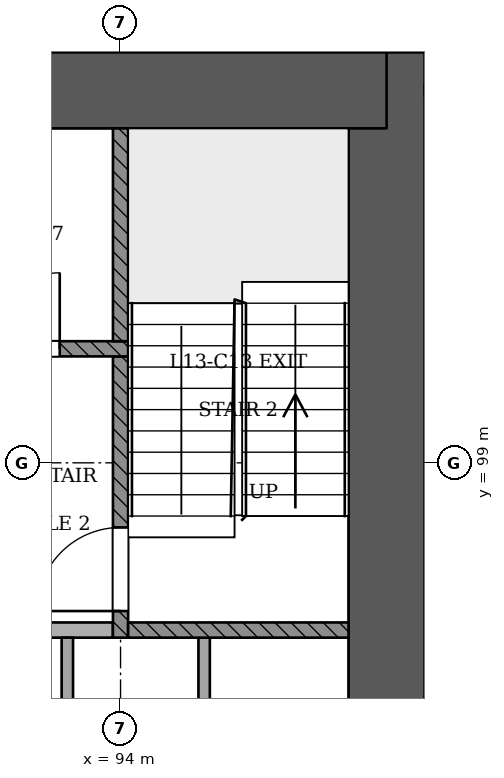
"""IFC4 building model, lengths in metres.
Left out: names, types, materials, properties, quantities, classifications, styles, units other than length and angle.
Written with IfcOpenShell. Run it as: python <this file> out.ifc"""

import sys

from ifc_helpers import new_model, si_unit, direction, frame, frame_2d, origin, place, context, subcontext, project, spatial, rectangle, extrude, element, fill, save


model = new_model("IFC4")
c1 = context("Model", 3, precision=1e-05, world=origin(), true_north=direction((0.0, 1.0)))
c2 = subcontext(c1, "Body", "Model", "MODEL_VIEW")
j1 = project(units=[si_unit("LENGTHUNIT", "METRE"), si_unit("PLANEANGLEUNIT", "RADIAN")], contexts=[c1])
p1 = place(None, origin())
s1 = spatial("IfcSite", under=j1, at=p1, CompositionType="ELEMENT")
p2 = place(p1, origin())
s2 = spatial("IfcBuilding", under=s1, at=p2, CompositionType="ELEMENT")
p3 = place(p2, frame((0.0, 0.0, 55.8)))
s3 = spatial("IfcBuildingStorey", under=s2, at=p3, CompositionType="ELEMENT", Elevation=55.8)
p4 = place(p3, frame((97.5, 92.9, 0.0), z_axis=(0.0, 0.0, 1.0), x_axis=(0.0, 1.0, 0.0)))
e1 = element("IfcWall", 1, at=p4, inside=s3, PredefinedType="SHEAR", context=c2, shape_type="SweptSolid", body=[
    extrude(rectangle(XDim=11.5, YDim=1.0, at=frame_2d((5.75, 0.0))), origin(), (0.0, 0.0, 1.0), 3.6),
])
p5 = place(p3, frame((97.5, 103.9, 0.0), z_axis=(0.0, 0.0, 1.0), x_axis=(-1.0, 0.0, 0.0)))
e2 = element("IfcWall", 2, at=p5, inside=s3, PredefinedType="SHEAR", context=c2, shape_type="SweptSolid", body=[
    extrude(rectangle(XDim=25.5, YDim=1.0, at=frame_2d((12.75, 0.0))), origin(), (0.0, 0.0, 1.0), 3.6),
])
for number, where, z_axis, x_axis in (
    (3, (93.3, 93.4, 0.0), (0.0, 0.0, 1.0), (0.0, 1.0, 0.0)),
    (4, (95.1, 93.4, 0.0), (0.0, 0.0, 1.0), (0.0, 1.0, 0.0)),
):
    element("IfcWall", number, at=place(p3, frame(where, z_axis=z_axis, x_axis=x_axis)), inside=s3, PredefinedType="PARTITIONING", context=c2, shape_type="SweptSolid", body=[
        extrude(rectangle(XDim=3.3, YDim=0.15, at=frame_2d((1.65, 0.0))), origin(), (0.0, 0.0, 1.0), 3.1),
    ])
p6 = place(p3, frame((91.5, 96.8, 0.0), z_axis=(0.0, 0.0, 1.0), x_axis=(1.0, 0.0, 0.0)))
e5 = element("IfcWall", 5, at=p6, inside=s3, PredefinedType="PARTITIONING", context=c2, shape_type="SweptSolid", body=[
    extrude(rectangle(XDim=2.4, YDim=0.2, at=frame_2d((1.2, 0.0))), origin(), (0.0, 0.0, 1.0), 3.1),
])
p7 = place(p3, frame((94.0, 96.7, 0.0), z_axis=(0.0, 0.0, 1.0), x_axis=(0.0, 1.0, 0.0)))
e6 = element("IfcWall", 6, at=p7, inside=s3, PredefinedType="SOLIDWALL", context=c2, shape_type="SweptSolid", body=[
    extrude(rectangle(XDim=3.7, YDim=0.2, at=frame_2d((1.85, 0.0))), origin(), (0.0, 0.0, 1.0), 3.1),
])
p8 = place(p7, frame((0.35, 0.0, 0.0)))
e7 = element("IfcOpeningElement", 7, at=p8, cuts=e6, PredefinedType="OPENING", context=c2, shape_type="SweptSolid", body=[
    extrude(rectangle(XDim=1.1, YDim=2.1, at=frame_2d((0.55, 1.05))), frame((0.0, 0.11, 0.0), z_axis=(0.0, -1.0, 0.0), x_axis=(1.0, 0.0, 0.0)), (0.0, 0.0, 1.0), 0.221),
])
p9 = place(p3, frame((94.1, 96.8, 0.0), z_axis=(0.0, 0.0, 1.0), x_axis=(1.0, 0.0, 0.0)))
e8 = element("IfcWall", 8, at=p9, inside=s3, PredefinedType="SOLIDWALL", context=c2, shape_type="SweptSolid", body=[
    extrude(rectangle(XDim=2.9, YDim=0.2, at=frame_2d((1.45, 0.0))), origin(), (0.0, 0.0, 1.0), 3.1),
])
p10 = place(p3, frame((75.9, 100.5, 0.0), z_axis=(0.0, 0.0, 1.0), x_axis=(1.0, 0.0, 0.0)))
e9 = element("IfcWall", 9, at=p10, inside=s3, PredefinedType="SOLIDWALL", context=c2, shape_type="SweptSolid", body=[
    extrude(rectangle(XDim=18.2, YDim=0.2, at=frame_2d((9.1, 0.0))), origin(), (0.0, 0.0, 1.0), 3.1),
])
p11 = place(p10, frame((2.6, 0.0, 0.0)))
e10 = element("IfcOpeningElement", 10, at=p11, cuts=e9, PredefinedType="OPENING", context=c2, shape_type="SweptSolid", body=[
    extrude(rectangle(XDim=1.1, YDim=2.1, at=frame_2d((0.55, 1.05))), frame((0.0, 0.11, 0.0), z_axis=(0.0, -1.0, 0.0), x_axis=(1.0, 0.0, 0.0)), (0.0, 0.0, 1.0), 0.221),
])
p12 = place(p10, frame((4.5, 0.0, 0.0)))
e11 = element("IfcOpeningElement", 11, at=p12, cuts=e9, PredefinedType="OPENING", context=c2, shape_type="SweptSolid", body=[
    extrude(rectangle(XDim=1.1, YDim=2.1, at=frame_2d((0.55, 1.05))), frame((0.0, 0.11, 0.0), z_axis=(0.0, -1.0, 0.0), x_axis=(1.0, 0.0, 0.0)), (0.0, 0.0, 1.0), 0.221),
])
p13 = place(p10, frame((6.4, 0.0, 0.0)))
e12 = element("IfcOpeningElement", 12, at=p13, cuts=e9, PredefinedType="OPENING", context=c2, shape_type="SweptSolid", body=[
    extrude(rectangle(XDim=1.1, YDim=2.1, at=frame_2d((0.55, 1.05))), frame((0.0, 0.11, 0.0), z_axis=(0.0, -1.0, 0.0), x_axis=(1.0, 0.0, 0.0)), (0.0, 0.0, 1.0), 0.221),
])
p14 = place(p10, frame((8.3, 0.0, 0.0)))
e13 = element("IfcOpeningElement", 13, at=p14, cuts=e9, PredefinedType="OPENING", context=c2, shape_type="SweptSolid", body=[
    extrude(rectangle(XDim=1.1, YDim=2.1, at=frame_2d((0.55, 1.05))), frame((0.0, 0.11, 0.0), z_axis=(0.0, -1.0, 0.0), x_axis=(1.0, 0.0, 0.0)), (0.0, 0.0, 1.0), 0.221),
])
p15 = place(p10, frame((10.2, 0.0, 0.0)))
e14 = element("IfcOpeningElement", 14, at=p15, cuts=e9, PredefinedType="OPENING", context=c2, shape_type="SweptSolid", body=[
    extrude(rectangle(XDim=1.1, YDim=2.1, at=frame_2d((0.55, 1.05))), frame((0.0, 0.11, 0.0), z_axis=(0.0, -1.0, 0.0), x_axis=(1.0, 0.0, 0.0)), (0.0, 0.0, 1.0), 0.221),
])
p16 = place(p10, frame((12.1, 0.0, 0.0)))
e15 = element("IfcOpeningElement", 15, at=p16, cuts=e9, PredefinedType="OPENING", context=c2, shape_type="SweptSolid", body=[
    extrude(rectangle(XDim=1.1, YDim=2.1, at=frame_2d((0.55, 1.05))), frame((0.0, 0.11, 0.0), z_axis=(0.0, -1.0, 0.0), x_axis=(1.0, 0.0, 0.0)), (0.0, 0.0, 1.0), 0.221),
])
p17 = place(p10, frame((14.0, 0.0, 0.0)))
e16 = element("IfcOpeningElement", 16, at=p17, cuts=e9, PredefinedType="OPENING", context=c2, shape_type="SweptSolid", body=[
    extrude(rectangle(XDim=1.1, YDim=2.1, at=frame_2d((0.55, 1.05))), frame((0.0, 0.11, 0.0), z_axis=(0.0, -1.0, 0.0), x_axis=(1.0, 0.0, 0.0)), (0.0, 0.0, 1.0), 0.221),
])
p18 = place(p10, frame((0.65, 0.0, 0.0)))
e17 = element("IfcOpeningElement", 17, at=p18, cuts=e9, PredefinedType="OPENING", context=c2, shape_type="SweptSolid", body=[
    extrude(rectangle(XDim=1.0, YDim=2.1, at=frame_2d((0.5, 1.05))), frame((0.0, 0.11, 0.0), z_axis=(0.0, -1.0, 0.0), x_axis=(1.0, 0.0, 0.0)), (0.0, 0.0, 1.0), 0.221),
])
p19 = place(p10, frame((16.3, 0.0, 0.0)))
e18 = element("IfcOpeningElement", 18, at=p19, cuts=e9, PredefinedType="OPENING", context=c2, shape_type="SweptSolid", body=[
    extrude(rectangle(XDim=1.0, YDim=2.1, at=frame_2d((0.5, 1.05))), frame((0.0, 0.11, 0.0), z_axis=(0.0, -1.0, 0.0), x_axis=(1.0, 0.0, 0.0)), (0.0, 0.0, 1.0), 0.221),
])
p20 = place(p3, frame((94.0, 100.6, 0.0), z_axis=(0.0, 0.0, 1.0), x_axis=(0.0, 1.0, 0.0)))
e19 = element("IfcWall", 19, at=p20, inside=s3, PredefinedType="SOLIDWALL", context=c2, shape_type="SweptSolid", body=[
    extrude(rectangle(XDim=2.8, YDim=0.2, at=frame_2d((1.4, 0.0))), origin(), (0.0, 0.0, 1.0), 3.1),
])
p21 = place(p8, origin())
e20 = element("IfcDoor", 20, at=p21, inside=s3, OperationType="SINGLE_SWING_LEFT", PredefinedType="NOTDEFINED", context=c2, shape_type="SweptSolid", body=[
    extrude(rectangle(XDim=1.1, YDim=2.1, at=frame_2d((0.55, 1.05))), frame((0.0, 0.025, 0.0), z_axis=(0.0, -1.0, 0.0), x_axis=(1.0, 0.0, 0.0)), (0.0, 0.0, 1.0), 0.05),
])
fill(e7, e20)
p22 = place(p19, origin())
e21 = element("IfcDoor", 21, at=p22, inside=s3, OperationType="SINGLE_SWING_RIGHT", PredefinedType="NOTDEFINED", context=c2, shape_type="SweptSolid", body=[
    extrude(rectangle(XDim=1.0, YDim=2.1, at=frame_2d((0.5, 1.05))), frame((0.0, 0.025, 0.0), z_axis=(0.0, -1.0, 0.0), x_axis=(1.0, 0.0, 0.0)), (0.0, 0.0, 1.0), 0.05),
])
fill(e18, e21)
save(model, sys.argv[1])
